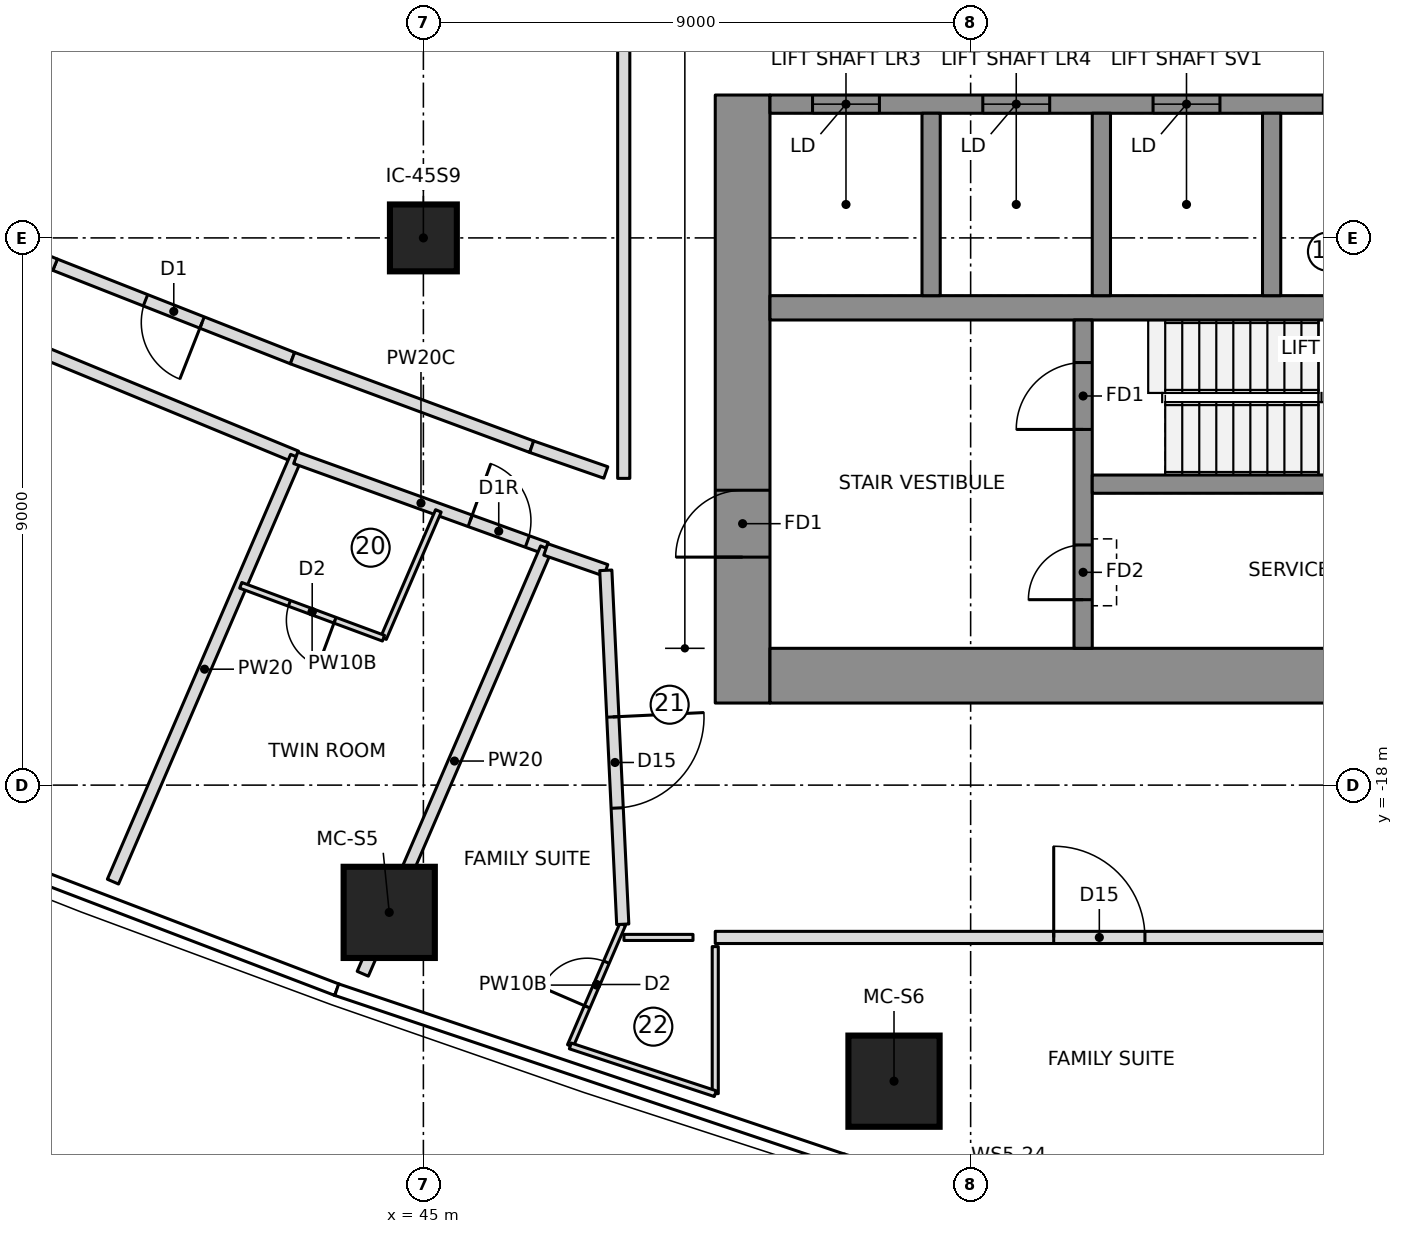
"""IFC4 building model, lengths in metres.
Left out: names, types, materials, properties, quantities, classifications, styles, units other than length and angle.
Written with IfcOpenShell. Run it as: python <this file> out.ifc"""

import sys

from ifc_helpers import new_model, si_unit, direction, frame, frame_2d, origin, origin_2d, place, context, subcontext, project, spatial, polyline, rectangle, outline, extrude, element, fill, save


model = new_model("IFC4")
c1 = context("Model", 3, precision=1e-05, world=origin(), true_north=direction((0.0, 1.0)))
c2 = subcontext(c1, "Body", "Model", "MODEL_VIEW")
j1 = project(units=[si_unit("LENGTHUNIT", "METRE"), si_unit("PLANEANGLEUNIT", "RADIAN")], contexts=[c1])
p1 = place(None, origin())
s1 = spatial("IfcSite", under=j1, at=p1, CompositionType="ELEMENT")
p2 = place(p1, origin())
s2 = spatial("IfcBuilding", under=s1, at=p2, CompositionType="ELEMENT")
p3 = place(p2, frame((0.0, 0.0, 130.2)))
s3 = spatial("IfcBuildingStorey", under=s2, at=p3, CompositionType="ELEMENT", Elevation=130.2)
p4 = place(p3, frame((50.25, -16.65, 0.0), z_axis=(0.0, 0.0, 1.0), x_axis=(0.0, 1.0, 0.0)))
e1 = element("IfcWall", 1, at=p4, inside=s3, PredefinedType="SHEAR", context=c2, shape_type="SweptSolid", body=[
    extrude(rectangle(XDim=10.0, YDim=0.9, at=frame_2d((5.0, 0.0))), origin(), (0.0, 0.0, 1.0), 3.55),
])
p5 = place(p4, frame((2.4, 0.0, 0.0)))
e2 = element("IfcOpeningElement", 2, at=p5, cuts=e1, PredefinedType="OPENING", context=c2, shape_type="SweptSolid", body=[
    extrude(rectangle(XDim=1.1, YDim=2.1, at=frame_2d((0.55, 1.05))), frame((0.0, 0.46, 0.0), z_axis=(0.0, -1.0, 0.0), x_axis=(1.0, 0.0, 0.0)), (0.0, 0.0, 1.0), 0.92),
])
p6 = place(p3, frame((50.7, -16.2, 0.0), z_axis=(0.0, 0.0, 1.0), x_axis=(1.0, 0.0, 0.0)))
e3 = element("IfcWall", 3, at=p6, inside=s3, PredefinedType="SHEAR", context=c2, shape_type="SweptSolid", body=[
    extrude(rectangle(XDim=13.92, YDim=0.9, at=frame_2d((6.96, 0.0))), origin(), (0.0, 0.0, 1.0), 3.55),
])
p7 = place(p3, frame((50.7, -10.15, 0.0), z_axis=(0.0, 0.0, 1.0), x_axis=(1.0, 0.0, 0.0)))
e4 = element("IfcWall", 4, at=p7, inside=s3, PredefinedType="SHEAR", context=c2, shape_type="SweptSolid", body=[
    extrude(rectangle(XDim=13.02, YDim=0.4, at=frame_2d((6.51, 0.0))), origin(), (0.0, 0.0, 1.0), 3.55),
])
p8 = place(p3, frame((50.7, -6.8, 0.0), z_axis=(0.0, 0.0, 1.0), x_axis=(1.0, 0.0, 0.0)))
e5 = element("IfcWall", 5, at=p8, inside=s3, PredefinedType="SHEAR", context=c2, shape_type="SweptSolid", body=[
    extrude(rectangle(XDim=10.9, YDim=0.3, at=frame_2d((5.45, 0.0))), origin(), (0.0, 0.0, 1.0), 3.55),
])
p9 = place(p8, frame((0.7, 0.0, 0.0)))
e6 = element("IfcOpeningElement", 6, at=p9, cuts=e5, PredefinedType="OPENING", context=c2, shape_type="SweptSolid", body=[
    extrude(rectangle(XDim=1.1, YDim=2.1, at=frame_2d((0.55, 1.05))), frame((0.0, 0.16, 0.0), z_axis=(0.0, -1.0, 0.0), x_axis=(1.0, 0.0, 0.0)), (0.0, 0.0, 1.0), 0.32),
])
p10 = place(p8, frame((3.5, 0.0, 0.0)))
e7 = element("IfcOpeningElement", 7, at=p10, cuts=e5, PredefinedType="OPENING", context=c2, shape_type="SweptSolid", body=[
    extrude(rectangle(XDim=1.1, YDim=2.1, at=frame_2d((0.55, 1.05))), frame((0.0, 0.16, 0.0), z_axis=(0.0, -1.0, 0.0), x_axis=(1.0, 0.0, 0.0)), (0.0, 0.0, 1.0), 0.32),
])
p11 = place(p8, frame((6.3, 0.0, 0.0)))
e8 = element("IfcOpeningElement", 8, at=p11, cuts=e5, PredefinedType="OPENING", context=c2, shape_type="SweptSolid", body=[
    extrude(rectangle(XDim=1.1, YDim=2.1, at=frame_2d((0.55, 1.05))), frame((0.0, 0.16, 0.0), z_axis=(0.0, -1.0, 0.0), x_axis=(1.0, 0.0, 0.0)), (0.0, 0.0, 1.0), 0.32),
])
p12 = place(p8, frame((9.1, 0.0, 0.0)))
e9 = element("IfcOpeningElement", 9, at=p12, cuts=e5, PredefinedType="OPENING", context=c2, shape_type="SweptSolid", body=[
    extrude(rectangle(XDim=1.1, YDim=2.1, at=frame_2d((0.55, 1.05))), frame((0.0, 0.16, 0.0), z_axis=(0.0, -1.0, 0.0), x_axis=(1.0, 0.0, 0.0)), (0.0, 0.0, 1.0), 0.32),
])
for number, where, z_axis, x_axis in (
    (10, (53.35, -9.95, 0.0), (0.0, 0.0, 1.0), (0.0, 1.0, 0.0)),
    (11, (56.15, -9.95, 0.0), (0.0, 0.0, 1.0), (0.0, 1.0, 0.0)),
    (12, (58.95, -9.95, 0.0), (0.0, 0.0, 1.0), (0.0, 1.0, 0.0)),
):
    element("IfcWall", number, at=place(p3, frame(where, z_axis=z_axis, x_axis=x_axis)), inside=s3, PredefinedType="SHEAR", context=c2, shape_type="SweptSolid", body=[
        extrude(rectangle(XDim=3.0, YDim=0.3, at=frame_2d((1.5, 0.0))), origin(), (0.0, 0.0, 1.0), 3.55),
    ])
p13 = place(p3, frame((55.85, -15.75, 0.0), z_axis=(0.0, 0.0, 1.0), x_axis=(0.0, 1.0, 0.0)))
e13 = element("IfcWall", 13, at=p13, inside=s3, PredefinedType="SHEAR", context=c2, shape_type="SweptSolid", body=[
    extrude(rectangle(XDim=5.4, YDim=0.3, at=frame_2d((2.7, 0.0))), origin(), (0.0, 0.0, 1.0), 3.55),
])
p14 = place(p13, frame((3.6, 0.0, 0.0)))
e14 = element("IfcOpeningElement", 14, at=p14, cuts=e13, PredefinedType="OPENING", context=c2, shape_type="SweptSolid", body=[
    extrude(rectangle(XDim=1.1, YDim=2.1, at=frame_2d((0.55, 1.05))), frame((0.0, 0.16, 0.0), z_axis=(0.0, -1.0, 0.0), x_axis=(1.0, 0.0, 0.0)), (0.0, 0.0, 1.0), 0.32),
])
p15 = place(p13, frame((0.8, 0.0, 0.0)))
e15 = element("IfcOpeningElement", 15, at=p15, cuts=e13, PredefinedType="OPENING", context=c2, shape_type="SweptSolid", body=[
    extrude(rectangle(XDim=0.9, YDim=2.1, at=frame_2d((0.45, 1.05))), frame((0.0, 0.16, 0.0), z_axis=(0.0, -1.0, 0.0), x_axis=(1.0, 0.0, 0.0)), (0.0, 0.0, 1.0), 0.32),
])
p16 = place(p3, frame((56.0, -13.05, 0.0), z_axis=(0.0, 0.0, 1.0), x_axis=(1.0, 0.0, 0.0)))
e16 = element("IfcWall", 16, at=p16, inside=s3, PredefinedType="SHEAR", context=c2, shape_type="SweptSolid", body=[
    extrude(rectangle(XDim=7.72, YDim=0.3, at=frame_2d((3.86, 0.0))), origin(), (0.0, 0.0, 1.0), 3.55),
])
for number, where, z_axis, x_axis in (
    (17, (44.438, -20.093, 0.0), (0.0, 0.0, 1.0), (1.0, 0.0, 0.0)),
    (18, (52.74, -22.869, 0.0), (0.0, 0.0, 1.0), (1.0, 0.0, 0.0)),
):
    element("IfcColumn", number, at=place(p3, frame(where, z_axis=z_axis, x_axis=x_axis)), inside=s3, PredefinedType="COLUMN", context=c2, shape_type="SweptSolid", body=[
        extrude(rectangle(XDim=1.5, YDim=1.5, at=origin_2d()), origin(), (0.0, 0.0, 1.0), 3.55),
    ])
p17 = place(p3, frame((45.0, -9.0, 0.0), z_axis=(0.0, 0.0, 1.0), x_axis=(1.0, 0.0, 0.0)))
e19 = element("IfcColumn", 19, at=p17, inside=s3, PredefinedType="COLUMN", context=c2, shape_type="SweptSolid", body=[
    extrude(rectangle(XDim=1.1, YDim=1.1, at=origin_2d()), origin(), (0.0, 0.0, 1.0), 3.55),
])
p18 = place(p3, frame((51.859, -24.257, 0.0), z_axis=(0.0, 0.0, 1.0), x_axis=(0.956964488344, -0.290205044837, 0.0)))
e20 = element("IfcWall", 20, at=p18, inside=s3, PredefinedType="NOTDEFINED", context=c2, shape_type="SweptSolid", body=[
    extrude(outline(polyline([(0.0, -0.2), (4.418, -0.2), (4.357, 0.2), (0.0, 0.2), (0.0, -0.2)])), origin(), (0.0, 0.0, 1.0), 3.25),
])
p19 = place(p18, frame((0.294, 0.0, 0.9)))
e21 = element("IfcOpeningElement", 21, at=p19, cuts=e20, PredefinedType="OPENING", context=c2, shape_type="SweptSolid", body=[
    extrude(rectangle(XDim=1.2, YDim=1.8, at=frame_2d((0.6, 0.9))), frame((0.0, 0.21, 0.0), z_axis=(0.0, -1.0, 0.0), x_axis=(1.0, 0.0, 0.0)), (0.0, 0.0, 1.0), 0.42),
])
p20 = place(p18, frame((1.694, 0.0, 0.9)))
e22 = element("IfcOpeningElement", 22, at=p20, cuts=e20, PredefinedType="OPENING", context=c2, shape_type="SweptSolid", body=[
    extrude(rectangle(XDim=2.4, YDim=1.8, at=frame_2d((1.2, 0.9))), frame((0.0, 0.21, 0.0), z_axis=(0.0, -1.0, 0.0), x_axis=(1.0, 0.0, 0.0)), (0.0, 0.0, 1.0), 0.42),
])
p21 = place(p3, frame((30.772, -7.594, 0.0), z_axis=(0.0, 0.0, 1.0), x_axis=(0.924461873383, -0.381274500407, 0.0)))
e23 = element("IfcWall", 23, at=p21, inside=s3, PredefinedType="PARTITIONING", context=c2, shape_type="SweptSolid", body=[
    extrude(rectangle(XDim=13.127, YDim=0.2, at=frame_2d((6.564, 0.0))), origin(), (0.0, 0.0, 1.0), 3.25),
])
p22 = place(p21, frame((4.25, 0.0, 0.0)))
e24 = element("IfcOpeningElement", 24, at=p22, cuts=e23, PredefinedType="OPENING", context=c2, shape_type="SweptSolid", body=[
    extrude(rectangle(XDim=1.5, YDim=2.1, at=frame_2d((0.75, 1.05))), frame((0.0, 0.11, 0.0), z_axis=(0.0, -1.0, 0.0), x_axis=(1.0, 0.0, 0.0)), (0.0, 0.0, 1.0), 0.22),
])
p23 = place(p3, frame((39.895, -19.587, 0.0), z_axis=(0.0, 0.0, 1.0), x_axis=(0.395993528256, 0.918253301426, 0.0)))
e25 = element("IfcWall", 25, at=p23, inside=s3, PredefinedType="PARTITIONING", context=c2, shape_type="SweptSolid", body=[
    extrude(rectangle(XDim=7.61, YDim=0.2, at=frame_2d((3.805, 0.0))), origin(), (0.0, 0.0, 1.0), 3.25),
])
p24 = place(p3, frame((42.9, -12.617, 0.0), z_axis=(0.0, 0.0, 1.0), x_axis=(0.940555877924, -0.339638985546, 0.0)))
e26 = element("IfcWall", 26, at=p24, inside=s3, PredefinedType="PARTITIONING", context=c2, shape_type="SweptSolid", body=[
    extrude(rectangle(XDim=4.381, YDim=0.2, at=frame_2d((2.19, 0.0))), origin(), (0.0, 0.0, 1.0), 3.25),
])
p25 = place(p24, frame((3.05, 0.0, 0.0)))
e27 = element("IfcOpeningElement", 27, at=p25, cuts=e26, PredefinedType="OPENING", context=c2, shape_type="SweptSolid", body=[
    extrude(rectangle(XDim=1.0, YDim=2.1, at=frame_2d((0.5, 1.05))), frame((0.0, 0.11, 0.0), z_axis=(0.0, -1.0, 0.0), x_axis=(1.0, 0.0, 0.0)), (0.0, 0.0, 1.0), 0.22),
])
p26 = place(p3, frame((45.247, -13.49, 0.0), z_axis=(0.0, 0.0, 1.0), x_axis=(-0.395960119478, -0.918267708124, 0.0)))
e28 = element("IfcWall", 28, at=p26, inside=s3, PredefinedType="PARTITIONING", context=c2, shape_type="SweptSolid", body=[
    extrude(rectangle(XDim=2.28, YDim=0.1, at=frame_2d((1.14, 0.0))), origin(), (0.0, 0.0, 1.0), 3.25),
])
p27 = place(p3, frame((44.344, -15.583, 0.0), z_axis=(0.0, 0.0, 1.0), x_axis=(-0.937752290113, 0.347304826323, 0.0)))
e29 = element("IfcWall", 29, at=p27, inside=s3, PredefinedType="PARTITIONING", context=c2, shape_type="SweptSolid", body=[
    extrude(rectangle(XDim=2.503, YDim=0.1, at=frame_2d((1.251, 0.0))), origin(), (0.0, 0.0, 1.0), 3.25),
])
p28 = place(p27, frame((0.85, 0.0, 0.0)))
e30 = element("IfcOpeningElement", 30, at=p28, cuts=e29, PredefinedType="OPENING", context=c2, shape_type="SweptSolid", body=[
    extrude(rectangle(XDim=0.8, YDim=2.1, at=frame_2d((0.4, 1.05))), frame((0.0, 0.06, 0.0), z_axis=(0.0, -1.0, 0.0), x_axis=(1.0, 0.0, 0.0)), (0.0, 0.0, 1.0), 0.12),
])
p29 = place(p3, frame((44.003, -21.102, 0.0), z_axis=(0.0, 0.0, 1.0), x_axis=(0.39600636385, 0.918247766014, 0.0)))
e31 = element("IfcWall", 31, at=p29, inside=s3, PredefinedType="PARTITIONING", context=c2, shape_type="SweptSolid", body=[
    extrude(rectangle(XDim=7.62, YDim=0.2, at=frame_2d((3.81, 0.0))), origin(), (0.0, 0.0, 1.0), 3.25),
])
p30 = place(p3, frame((47.416, -22.289, 0.0), z_axis=(0.0, 0.0, 1.0), x_axis=(0.396028123143, 0.918238381729, 0.0)))
e32 = element("IfcWall", 32, at=p30, inside=s3, PredefinedType="PARTITIONING", context=c2, shape_type="SweptSolid", body=[
    extrude(rectangle(XDim=2.179, YDim=0.1, at=frame_2d((1.089, 0.0))), origin(), (0.0, 0.0, 1.0), 3.25),
])
p31 = place(p30, frame((0.7, 0.0, 0.0)))
e33 = element("IfcOpeningElement", 33, at=p31, cuts=e32, PredefinedType="OPENING", context=c2, shape_type="SweptSolid", body=[
    extrude(rectangle(XDim=0.8, YDim=2.1, at=frame_2d((0.4, 1.05))), frame((0.0, 0.06, 0.0), z_axis=(0.0, -1.0, 0.0), x_axis=(1.0, 0.0, 0.0)), (0.0, 0.0, 1.0), 0.12),
])
p32 = place(p3, frame((42.847, -10.977, 0.0), z_axis=(0.0, 0.0, 1.0), x_axis=(-0.930576677263, 0.36609704688, 0.0)))
e34 = element("IfcWall", 34, at=p32, inside=s3, PredefinedType="PARTITIONING", context=c2, shape_type="SweptSolid", body=[
    extrude(rectangle(XDim=4.195, YDim=0.2, at=frame_2d((2.098, 0.0))), origin(), (0.0, 0.0, 1.0), 3.25),
])
p33 = place(p32, frame((1.598, 0.0, 0.0)))
e35 = element("IfcOpeningElement", 35, at=p33, cuts=e34, PredefinedType="OPENING", context=c2, shape_type="SweptSolid", body=[
    extrude(rectangle(XDim=1.0, YDim=2.1, at=frame_2d((0.5, 1.05))), frame((0.0, 0.11, 0.0), z_axis=(0.0, -1.0, 0.0), x_axis=(1.0, 0.0, 0.0)), (0.0, 0.0, 1.0), 0.22),
])
p34 = place(p3, frame((46.781, -12.434, 0.0), z_axis=(0.0, 0.0, 1.0), x_axis=(-0.937732614305, 0.347357948044, 0.0)))
e36 = element("IfcWall", 36, at=p34, inside=s3, PredefinedType="PARTITIONING", context=c2, shape_type="SweptSolid", body=[
    extrude(rectangle(XDim=4.195, YDim=0.2, at=frame_2d((2.098, 0.0))), origin(), (0.0, 0.0, 1.0), 3.25),
])
p35 = place(p3, frame((38.943, -9.441, 0.0), z_axis=(0.0, 0.0, 1.0), x_axis=(-0.923008963065, 0.384778448073, 0.0)))
e37 = element("IfcWall", 37, at=p35, inside=s3, PredefinedType="PARTITIONING", context=c2, shape_type="SweptSolid", body=[
    extrude(rectangle(XDim=2.339, YDim=0.2, at=frame_2d((1.169, 0.0))), origin(), (0.0, 0.0, 1.0), 3.25),
])
p36 = place(p3, frame((49.8, -20.505, 0.0), z_axis=(0.0, 0.0, 1.0), x_axis=(1.0, 0.0, 0.0)))
e38 = element("IfcWall", 38, at=p36, inside=s3, PredefinedType="PARTITIONING", context=c2, shape_type="SweptSolid", body=[
    extrude(rectangle(XDim=12.133, YDim=0.2, at=frame_2d((6.066, 0.0))), origin(), (0.0, 0.0, 1.0), 3.25),
])
p37 = place(p36, frame((5.566, 0.0, 0.0)))
e39 = element("IfcOpeningElement", 39, at=p37, cuts=e38, PredefinedType="OPENING", context=c2, shape_type="SweptSolid", body=[
    extrude(rectangle(XDim=1.5, YDim=2.1, at=frame_2d((0.75, 1.05))), frame((0.0, 0.11, 0.0), z_axis=(0.0, -1.0, 0.0), x_axis=(1.0, 0.0, 0.0)), (0.0, 0.0, 1.0), 0.22),
])
p38 = place(p3, frame((48.299, -20.505, 0.0), z_axis=(0.0, 0.0, 1.0), x_axis=(1.0, 0.0, 0.0)))
e40 = element("IfcWall", 40, at=p38, inside=s3, PredefinedType="PARTITIONING", context=c2, shape_type="SweptSolid", body=[
    extrude(rectangle(XDim=1.135, YDim=0.1, at=frame_2d((0.568, 0.0))), origin(), (0.0, 0.0, 1.0), 3.25),
])
p39 = place(p3, frame((49.8, -20.656, 0.0), z_axis=(0.0, 0.0, 1.0), x_axis=(0.0, -1.0, 0.0)))
e41 = element("IfcWall", 41, at=p39, inside=s3, PredefinedType="PARTITIONING", context=c2, shape_type="SweptSolid", body=[
    extrude(rectangle(XDim=2.418, YDim=0.1, at=frame_2d((1.209, 0.0))), origin(), (0.0, 0.0, 1.0), 3.25),
])
p40 = place(p3, frame((49.8, -23.074, 0.0), z_axis=(0.0, 0.0, 1.0), x_axis=(-0.949844078437, 0.312723882455, 0.0)))
e42 = element("IfcWall", 42, at=p40, inside=s3, PredefinedType="PARTITIONING", context=c2, shape_type="SweptSolid", body=[
    extrude(rectangle(XDim=2.51, YDim=0.1, at=frame_2d((1.255, 0.0))), origin(), (0.0, 0.0, 1.0), 3.25),
])
p41 = place(p3, frame((47.012, -14.124, 0.0), z_axis=(0.0, 0.0, 1.0), x_axis=(0.944566081842, -0.32832136244, 0.0)))
e43 = element("IfcWall", 43, at=p41, inside=s3, PredefinedType="PARTITIONING", context=c2, shape_type="SweptSolid", body=[
    extrude(rectangle(XDim=1.045, YDim=0.2, at=frame_2d((0.523, 0.0))), origin(), (0.0, 0.0, 1.0), 3.25),
])
p42 = place(p3, frame((48.0, -12.858, 0.0), z_axis=(0.0, 0.0, 1.0), x_axis=(-0.944517215109, 0.328461916152, 0.0)))
e44 = element("IfcWall", 44, at=p42, inside=s3, PredefinedType="PARTITIONING", context=c2, shape_type="SweptSolid", body=[
    extrude(rectangle(XDim=1.29, YDim=0.2, at=frame_2d((0.645, 0.0))), origin(), (0.0, 0.0, 1.0), 3.25),
])
p43 = place(p3, frame((48.0, -14.467, 0.0), z_axis=(0.0, 0.0, 1.0), x_axis=(0.047837808481, -0.998855116661, 0.0)))
e45 = element("IfcWall", 45, at=p43, inside=s3, PredefinedType="PARTITIONING", context=c2, shape_type="SweptSolid", body=[
    extrude(rectangle(XDim=5.828, YDim=0.2, at=frame_2d((2.914, 0.0))), origin(), (0.0, 0.0, 1.0), 3.25),
])
p44 = place(p43, frame((2.414, 0.0, 0.0)))
e46 = element("IfcOpeningElement", 46, at=p44, cuts=e45, PredefinedType="OPENING", context=c2, shape_type="SweptSolid", body=[
    extrude(rectangle(XDim=1.5, YDim=2.1, at=frame_2d((0.75, 1.05))), frame((0.0, 0.11, 0.0), z_axis=(0.0, -1.0, 0.0), x_axis=(1.0, 0.0, 0.0)), (0.0, 0.0, 1.0), 0.22),
])
p45 = place(p3, frame((48.295, 12.955, 0.0), z_axis=(0.0, 0.0, 1.0), x_axis=(0.0, -1.0, 0.0)))
e47 = element("IfcWall", 47, at=p45, inside=s3, PredefinedType="PARTITIONING", context=c2, shape_type="SweptSolid", body=[
    extrude(rectangle(XDim=25.91, YDim=0.2, at=frame_2d((12.955, 0.0))), origin(), (0.0, 0.0, 1.0), 3.25),
])
p46 = place(p28, origin())
e48 = element("IfcDoor", 48, at=p46, inside=s3, OperationType="SINGLE_SWING_LEFT", PredefinedType="DOOR", context=c2, shape_type="SweptSolid", body=[
    extrude(rectangle(XDim=0.8, YDim=2.1, at=frame_2d((0.4, 1.05))), frame((0.0, 0.025, 0.0), z_axis=(0.0, -1.0, 0.0), x_axis=(1.0, 0.0, 0.0)), (0.0, 0.0, 1.0), 0.05),
])
fill(e30, e48)
p47 = place(p25, origin())
e49 = element("IfcDoor", 49, at=p47, inside=s3, OperationType="SINGLE_SWING_RIGHT", PredefinedType="DOOR", context=c2, shape_type="SweptSolid", body=[
    extrude(rectangle(XDim=1.0, YDim=2.1, at=frame_2d((0.5, 1.05))), frame((0.0, 0.025, 0.0), z_axis=(0.0, -1.0, 0.0), x_axis=(1.0, 0.0, 0.0)), (0.0, 0.0, 1.0), 0.05),
])
fill(e27, e49)
p48 = place(p31, origin())
e50 = element("IfcDoor", 50, at=p48, inside=s3, OperationType="SINGLE_SWING_LEFT", PredefinedType="DOOR", context=c2, shape_type="SweptSolid", body=[
    extrude(rectangle(XDim=0.8, YDim=2.1, at=frame_2d((0.4, 1.05))), frame((0.0, 0.025, 0.0), z_axis=(0.0, -1.0, 0.0), x_axis=(1.0, 0.0, 0.0)), (0.0, 0.0, 1.0), 0.05),
])
fill(e33, e50)
p49 = place(p33, origin())
e51 = element("IfcDoor", 51, at=p49, inside=s3, OperationType="SINGLE_SWING_LEFT", PredefinedType="DOOR", context=c2, shape_type="SweptSolid", body=[
    extrude(rectangle(XDim=1.0, YDim=2.1, at=frame_2d((0.5, 1.05))), frame((0.0, 0.025, 0.0), z_axis=(0.0, -1.0, 0.0), x_axis=(1.0, 0.0, 0.0)), (0.0, 0.0, 1.0), 0.05),
])
fill(e35, e51)
p50 = place(p37, origin())
e52 = element("IfcDoor", 52, at=p50, inside=s3, OperationType="DOUBLE_DOOR_SINGLE_SWING", PredefinedType="DOOR", context=c2, shape_type="SweptSolid", body=[
    extrude(rectangle(XDim=1.5, YDim=2.1, at=frame_2d((0.75, 1.05))), frame((0.0, 0.025, 0.0), z_axis=(0.0, -1.0, 0.0), x_axis=(1.0, 0.0, 0.0)), (0.0, 0.0, 1.0), 0.05),
])
fill(e39, e52)
p51 = place(p44, origin())
e53 = element("IfcDoor", 53, at=p51, inside=s3, OperationType="DOUBLE_DOOR_SINGLE_SWING", PredefinedType="DOOR", context=c2, shape_type="SweptSolid", body=[
    extrude(rectangle(XDim=1.5, YDim=2.1, at=frame_2d((0.75, 1.05))), frame((0.0, 0.025, 0.0), z_axis=(0.0, -1.0, 0.0), x_axis=(1.0, 0.0, 0.0)), (0.0, 0.0, 1.0), 0.05),
])
fill(e46, e53)
p52 = place(p9, origin())
e54 = element("IfcDoor", 54, at=p52, inside=s3, OperationType="DOUBLE_DOOR_SLIDING", PredefinedType="DOOR", context=c2, shape_type="SweptSolid", body=[
    extrude(rectangle(XDim=1.1, YDim=2.1, at=frame_2d((0.55, 1.05))), frame((0.0, 0.025, 0.0), z_axis=(0.0, -1.0, 0.0), x_axis=(1.0, 0.0, 0.0)), (0.0, 0.0, 1.0), 0.05),
])
fill(e6, e54)
p53 = place(p10, origin())
e55 = element("IfcDoor", 55, at=p53, inside=s3, OperationType="DOUBLE_DOOR_SLIDING", PredefinedType="DOOR", context=c2, shape_type="SweptSolid", body=[
    extrude(rectangle(XDim=1.1, YDim=2.1, at=frame_2d((0.55, 1.05))), frame((0.0, 0.025, 0.0), z_axis=(0.0, -1.0, 0.0), x_axis=(1.0, 0.0, 0.0)), (0.0, 0.0, 1.0), 0.05),
])
fill(e7, e55)
p54 = place(p11, origin())
e56 = element("IfcDoor", 56, at=p54, inside=s3, OperationType="DOUBLE_DOOR_SLIDING", PredefinedType="DOOR", context=c2, shape_type="SweptSolid", body=[
    extrude(rectangle(XDim=1.1, YDim=2.1, at=frame_2d((0.55, 1.05))), frame((0.0, 0.025, 0.0), z_axis=(0.0, -1.0, 0.0), x_axis=(1.0, 0.0, 0.0)), (0.0, 0.0, 1.0), 0.05),
])
fill(e8, e56)
p55 = place(p14, origin())
e57 = element("IfcDoor", 57, at=p55, inside=s3, OperationType="SINGLE_SWING_RIGHT", PredefinedType="DOOR", context=c2, shape_type="SweptSolid", body=[
    extrude(rectangle(XDim=1.1, YDim=2.1, at=frame_2d((0.55, 1.05))), frame((0.0, 0.025, 0.0), z_axis=(0.0, -1.0, 0.0), x_axis=(1.0, 0.0, 0.0)), (0.0, 0.0, 1.0), 0.05),
])
fill(e14, e57)
p56 = place(p5, origin())
e58 = element("IfcDoor", 58, at=p56, inside=s3, OperationType="SINGLE_SWING_RIGHT", PredefinedType="DOOR", context=c2, shape_type="SweptSolid", body=[
    extrude(rectangle(XDim=1.1, YDim=2.1, at=frame_2d((0.55, 1.05))), frame((0.0, 0.025, 0.0), z_axis=(0.0, -1.0, 0.0), x_axis=(1.0, 0.0, 0.0)), (0.0, 0.0, 1.0), 0.05),
])
fill(e2, e58)
p57 = place(p15, origin())
e59 = element("IfcDoor", 59, at=p57, inside=s3, OperationType="SINGLE_SWING_LEFT", PredefinedType="DOOR", context=c2, shape_type="SweptSolid", body=[
    extrude(rectangle(XDim=0.9, YDim=2.1, at=frame_2d((0.45, 1.05))), frame((0.0, 0.025, 0.0), z_axis=(0.0, -1.0, 0.0), x_axis=(1.0, 0.0, 0.0)), (0.0, 0.0, 1.0), 0.05),
])
fill(e15, e59)
save(model, sys.argv[1])
